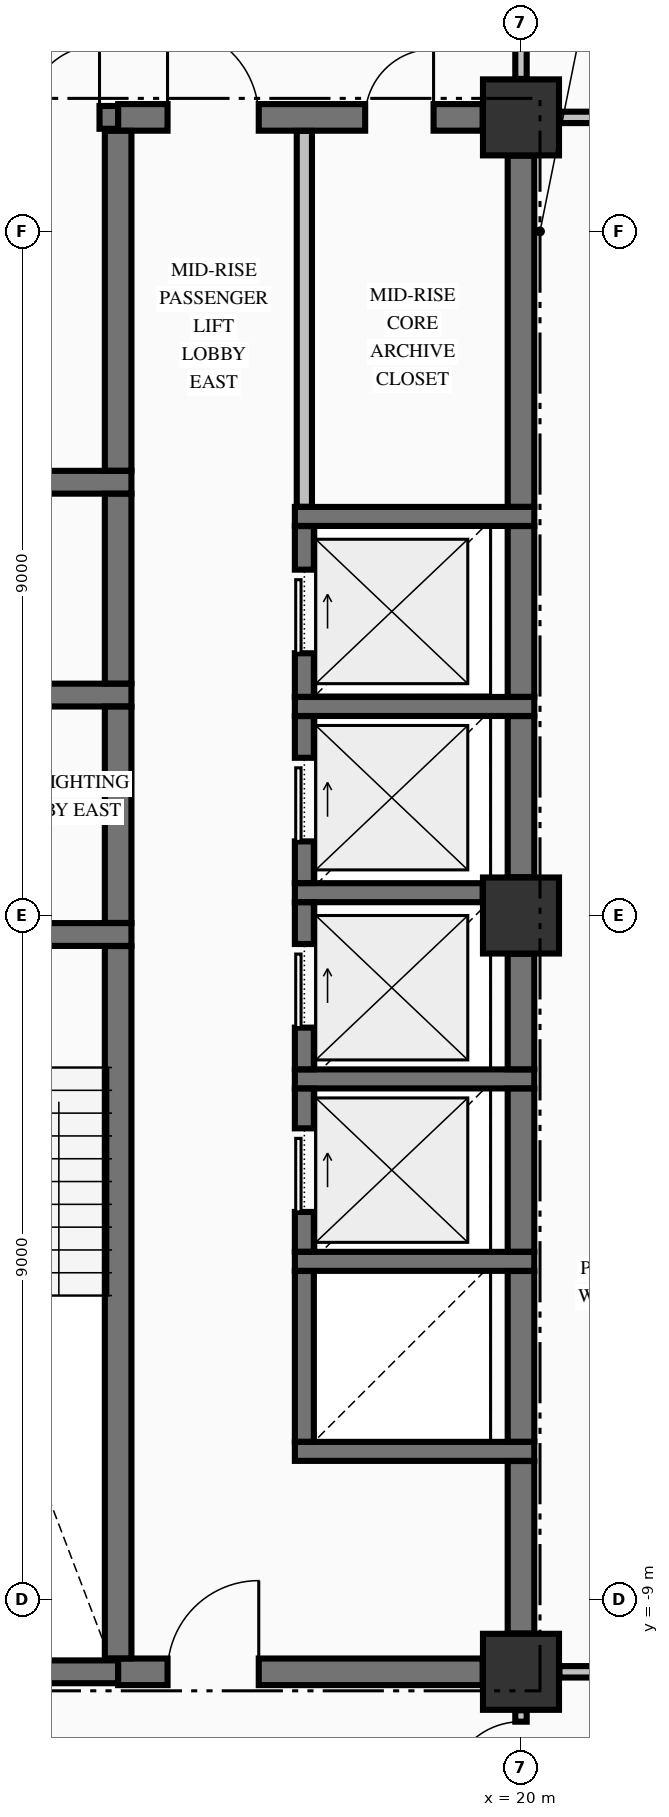
"""IFC4 building model, lengths in metres.
Left out: names, types, materials, properties, quantities, classifications, styles, units other than length and angle.
Written with IfcOpenShell. Run it as: python <this file> out.ifc"""

import sys

from ifc_helpers import new_model, si_unit, direction, frame, frame_2d, origin, origin_2d, place, context, subcontext, project, spatial, rectangle, extrude, element, fill, save


model = new_model("IFC4")
c1 = context("Model", 3, precision=1e-05, world=origin(), true_north=direction((0.0, 1.0)))
c2 = subcontext(c1, "Body", "Model", "MODEL_VIEW")
j1 = project(units=[si_unit("LENGTHUNIT", "METRE"), si_unit("PLANEANGLEUNIT", "RADIAN")], contexts=[c1])
p1 = place(None, origin())
s1 = spatial("IfcSite", under=j1, at=p1, CompositionType="ELEMENT")
p2 = place(p1, origin())
s2 = spatial("IfcBuilding", under=s1, at=p2, CompositionType="ELEMENT")
p3 = place(p2, frame((0.0, 0.0, 128.49)))
s3 = spatial("IfcBuildingStorey", under=s2, at=p3, CompositionType="ELEMENT", Elevation=128.49)
for number, where, z_axis, x_axis in (
    (1, (20.0, -9.95, -0.25), (0.0, 0.0, 1.0), (1.0, 0.0, 0.0)),
    (2, (20.0, 10.5, -0.25), (0.0, 0.0, 1.0), (1.0, 0.0, 0.0)),
    (3, (20.0, 0.0, -0.25), (0.0, 0.0, 1.0), (1.0, 0.0, 0.0)),
):
    element("IfcColumn", number, at=place(p3, frame(where, z_axis=z_axis, x_axis=x_axis)), inside=s3, PredefinedType="COLUMN", context=c2, shape_type="SweptSolid", body=[
        extrude(rectangle(XDim=1.0, YDim=1.0, at=origin_2d()), origin(), (0.0, 0.0, 1.0), 3.57),
    ])
p4 = place(p3, frame((11.504, -9.95, 0.0), z_axis=(0.0, 0.0, 1.0), x_axis=(1.0, 0.0, 0.0)))
e4 = element("IfcWall", 4, at=p4, inside=s3, PredefinedType="SHEAR", context=c2, shape_type="SweptSolid", body=[
    extrude(rectangle(XDim=3.196, YDim=0.3, at=frame_2d((1.598, 0.0))), origin(), (0.0, 0.0, 1.0), 3.32),
])
p5 = place(p3, frame((14.7, -9.95, 0.0), z_axis=(0.0, 0.0, 1.0), x_axis=(1.0, 0.0, 0.0)))
e5 = element("IfcWall", 5, at=p5, inside=s3, PredefinedType="SHEAR", context=c2, shape_type="SweptSolid", body=[
    extrude(rectangle(XDim=4.796, YDim=0.35, at=frame_2d((2.398, 0.0))), origin(), (0.0, 0.0, 1.0), 3.32),
])
p6 = place(p5, frame((0.65, 0.0, 0.0)))
e6 = element("IfcOpeningElement", 6, at=p6, cuts=e5, PredefinedType="OPENING", context=c2, shape_type="SweptSolid", body=[
    extrude(rectangle(XDim=1.2, YDim=2.15, at=frame_2d((0.6, 1.075))), frame((0.0, 0.185, 0.0), z_axis=(0.0, -1.0, 0.0), x_axis=(1.0, 0.0, 0.0)), (0.0, 0.0, 1.0), 0.37),
])
for number, where, z_axis, x_axis in (
    (7, (17.025, -7.05, 0.0), (0.0, 0.0, 1.0), (1.0, 0.0, 0.0)),
    (8, (17.025, -4.55, 0.0), (0.0, 0.0, 1.0), (1.0, 0.0, 0.0)),
    (9, (17.025, -2.15, 0.0), (0.0, 0.0, 1.0), (1.0, 0.0, 0.0)),
):
    element("IfcWall", number, at=place(p3, frame(where, z_axis=z_axis, x_axis=x_axis)), inside=s3, PredefinedType="SOLIDWALL", context=c2, shape_type="SweptSolid", body=[
        extrude(rectangle(XDim=3.15, YDim=0.25, at=frame_2d((1.575, 0.0))), origin(), (0.0, 0.0, 1.0), 3.32),
    ])
p7 = place(p3, frame((11.504, -0.25, 0.0), z_axis=(0.0, 0.0, 1.0), x_axis=(1.0, 0.0, 0.0)))
e10 = element("IfcWall", 10, at=p7, inside=s3, PredefinedType="SHEAR", context=c2, shape_type="SweptSolid", body=[
    extrude(rectangle(XDim=3.371, YDim=0.3, at=frame_2d((1.686, 0.0))), origin(), (0.0, 0.0, 1.0), 3.32),
])
p8 = place(p7, frame((1.096, 0.0, 0.0)))
e11 = element("IfcOpeningElement", 11, at=p8, cuts=e10, PredefinedType="OPENING", context=c2, shape_type="SweptSolid", body=[
    extrude(rectangle(XDim=1.1, YDim=2.15, at=frame_2d((0.55, 1.075))), frame((0.0, 0.16, 0.0), z_axis=(0.0, -1.0, 0.0), x_axis=(1.0, 0.0, 0.0)), (0.0, 0.0, 1.0), 0.32),
])
p9 = place(p3, frame((17.025, 0.3, 0.0), z_axis=(0.0, 0.0, 1.0), x_axis=(1.0, 0.0, 0.0)))
e12 = element("IfcWall", 12, at=p9, inside=s3, PredefinedType="SOLIDWALL", context=c2, shape_type="SweptSolid", body=[
    extrude(rectangle(XDim=2.471, YDim=0.25, at=frame_2d((1.236, 0.0))), origin(), (0.0, 0.0, 1.0), 3.32),
])
p10 = place(p3, frame((17.025, 2.75, 0.0), z_axis=(0.0, 0.0, 1.0), x_axis=(1.0, 0.0, 0.0)))
e13 = element("IfcWall", 13, at=p10, inside=s3, PredefinedType="SOLIDWALL", context=c2, shape_type="SweptSolid", body=[
    extrude(rectangle(XDim=3.15, YDim=0.25, at=frame_2d((1.575, 0.0))), origin(), (0.0, 0.0, 1.0), 3.32),
])
p11 = place(p3, frame((10.85, 2.9, 0.0), z_axis=(0.0, 0.0, 1.0), x_axis=(1.0, 0.0, 0.0)))
e14 = element("IfcWall", 14, at=p11, inside=s3, PredefinedType="SHEAR", context=c2, shape_type="SweptSolid", body=[
    extrude(rectangle(XDim=4.025, YDim=0.3, at=frame_2d((2.012, 0.0))), origin(), (0.0, 0.0, 1.0), 3.32),
])
p12 = place(p11, frame((0.85, 0.0, 0.0)))
e15 = element("IfcOpeningElement", 15, at=p12, cuts=e14, PredefinedType="OPENING", context=c2, shape_type="SweptSolid", body=[
    extrude(rectangle(XDim=1.1, YDim=2.2, at=frame_2d((0.55, 1.1))), frame((0.0, 0.16, 0.0), z_axis=(0.0, -1.0, 0.0), x_axis=(1.0, 0.0, 0.0)), (0.0, 0.0, 1.0), 0.32),
])
p13 = place(p3, frame((17.025, 5.25, 0.0), z_axis=(0.0, 0.0, 1.0), x_axis=(1.0, 0.0, 0.0)))
e16 = element("IfcWall", 16, at=p13, inside=s3, PredefinedType="SOLIDWALL", context=c2, shape_type="SweptSolid", body=[
    extrude(rectangle(XDim=3.15, YDim=0.25, at=frame_2d((1.575, 0.0))), origin(), (0.0, 0.0, 1.0), 3.32),
])
p14 = place(p3, frame((10.85, 5.7, 0.0), z_axis=(0.0, 0.0, 1.0), x_axis=(1.0, 0.0, 0.0)))
e17 = element("IfcWall", 17, at=p14, inside=s3, PredefinedType="SHEAR", context=c2, shape_type="SweptSolid", body=[
    extrude(rectangle(XDim=4.025, YDim=0.3, at=frame_2d((2.012, 0.0))), origin(), (0.0, 0.0, 1.0), 3.32),
])
p15 = place(p3, frame((11.504, 10.5, 0.0), z_axis=(0.0, 0.0, 1.0), x_axis=(1.0, 0.0, 0.0)))
e18 = element("IfcWall", 18, at=p15, inside=s3, PredefinedType="SHEAR", context=c2, shape_type="SweptSolid", body=[
    extrude(rectangle(XDim=3.196, YDim=0.3, at=frame_2d((1.598, 0.0))), origin(), (0.0, 0.0, 1.0), 3.32),
])
p16 = place(p15, frame((2.001, 0.0, 0.0)))
e19 = element("IfcOpeningElement", 19, at=p16, cuts=e18, PredefinedType="OPENING", context=c2, shape_type="SweptSolid", body=[
    extrude(rectangle(XDim=0.95, YDim=2.15, at=frame_2d((0.475, 1.075))), frame((0.0, 0.16, 0.0), z_axis=(0.0, -1.0, 0.0), x_axis=(1.0, 0.0, 0.0)), (0.0, 0.0, 1.0), 0.32),
])
p17 = place(p3, frame((14.7, 10.5, 0.0), z_axis=(0.0, 0.0, 1.0), x_axis=(1.0, 0.0, 0.0)))
e20 = element("IfcWall", 20, at=p17, inside=s3, PredefinedType="SHEAR", context=c2, shape_type="SweptSolid", body=[
    extrude(rectangle(XDim=4.796, YDim=0.35, at=frame_2d((2.398, 0.0))), origin(), (0.0, 0.0, 1.0), 3.32),
])
p18 = place(p17, frame((0.65, 0.0, 0.0)))
e21 = element("IfcOpeningElement", 21, at=p18, cuts=e20, PredefinedType="OPENING", context=c2, shape_type="SweptSolid", body=[
    extrude(rectangle(XDim=1.2, YDim=2.15, at=frame_2d((0.6, 1.075))), frame((0.0, 0.185, 0.0), z_axis=(0.0, -1.0, 0.0), x_axis=(1.0, 0.0, 0.0)), (0.0, 0.0, 1.0), 0.37),
])
p19 = place(p17, frame((3.25, 0.0, 0.0)))
e22 = element("IfcOpeningElement", 22, at=p19, cuts=e20, PredefinedType="OPENING", context=c2, shape_type="SweptSolid", body=[
    extrude(rectangle(XDim=0.9, YDim=2.15, at=frame_2d((0.45, 1.075))), frame((0.0, 0.185, 0.0), z_axis=(0.0, -1.0, 0.0), x_axis=(1.0, 0.0, 0.0)), (0.0, 0.0, 1.0), 0.37),
])
p20 = place(p3, frame((20.506, -9.95, 0.0), z_axis=(0.0, 0.0, 1.0), x_axis=(1.0, 0.0, 0.0)))
e23 = element("IfcWall", 23, at=p20, inside=s3, PredefinedType="PARTITIONING", context=c2, shape_type="SweptSolid", body=[
    extrude(rectangle(XDim=2.329, YDim=0.15, at=frame_2d((1.165, 0.0))), origin(), (0.0, 0.0, 1.0), 3.32),
])
p21 = place(p20, frame((0.494, 0.0, 0.0)))
e24 = element("IfcOpeningElement", 24, at=p21, cuts=e23, PredefinedType="OPENING", context=c2, shape_type="SweptSolid", body=[
    extrude(rectangle(XDim=1.0, YDim=2.15, at=frame_2d((0.5, 1.075))), frame((0.0, 0.085, 0.0), z_axis=(0.0, -1.0, 0.0), x_axis=(1.0, 0.0, 0.0)), (0.0, 0.0, 1.0), 0.17),
])
p22 = place(p3, frame((20.506, 10.5, 0.0), z_axis=(0.0, 0.0, 1.0), x_axis=(1.0, 0.0, 0.0)))
e25 = element("IfcWall", 25, at=p22, inside=s3, PredefinedType="PARTITIONING", context=c2, shape_type="SweptSolid", body=[
    extrude(rectangle(XDim=2.329, YDim=0.15, at=frame_2d((1.165, 0.0))), origin(), (0.0, 0.0, 1.0), 3.32),
])
p23 = place(p22, frame((0.494, 0.0, 0.0)))
e26 = element("IfcOpeningElement", 26, at=p23, cuts=e25, PredefinedType="OPENING", context=c2, shape_type="SweptSolid", body=[
    extrude(rectangle(XDim=1.0, YDim=2.15, at=frame_2d((0.5, 1.075))), frame((0.0, 0.085, 0.0), z_axis=(0.0, -1.0, 0.0), x_axis=(1.0, 0.0, 0.0)), (0.0, 0.0, 1.0), 0.17),
])
p24 = place(p3, frame((14.7, -9.773, 0.0), z_axis=(0.0, 0.0, 1.0), x_axis=(0.0, 1.0, 0.0)))
e27 = element("IfcWall", 27, at=p24, inside=s3, PredefinedType="SHEAR", context=c2, shape_type="SweptSolid", body=[
    extrude(rectangle(XDim=9.371, YDim=0.35, at=frame_2d((4.686, 0.0))), origin(), (0.0, 0.0, 1.0), 3.32),
])
p25 = place(p3, frame((14.7, -0.098, 0.0), z_axis=(0.0, 0.0, 1.0), x_axis=(0.0, 1.0, 0.0)))
e28 = element("IfcWall", 28, at=p25, inside=s3, PredefinedType="SHEAR", context=c2, shape_type="SweptSolid", body=[
    extrude(rectangle(XDim=2.846, YDim=0.35, at=frame_2d((1.423, 0.0))), origin(), (0.0, 0.0, 1.0), 3.32),
])
p26 = place(p3, frame((14.7, 3.052, 0.0), z_axis=(0.0, 0.0, 1.0), x_axis=(0.0, 1.0, 0.0)))
e29 = element("IfcWall", 29, at=p26, inside=s3, PredefinedType="SHEAR", context=c2, shape_type="SweptSolid", body=[
    extrude(rectangle(XDim=2.496, YDim=0.35, at=frame_2d((1.248, 0.0))), origin(), (0.0, 0.0, 1.0), 3.32),
])
p27 = place(p3, frame((14.7, 5.852, 0.0), z_axis=(0.0, 0.0, 1.0), x_axis=(0.0, 1.0, 0.0)))
e30 = element("IfcWall", 30, at=p27, inside=s3, PredefinedType="SHEAR", context=c2, shape_type="SweptSolid", body=[
    extrude(rectangle(XDim=4.471, YDim=0.35, at=frame_2d((2.235, 0.0))), origin(), (0.0, 0.0, 1.0), 3.32),
])
p28 = place(p3, frame((17.15, -6.923, 0.0), z_axis=(0.0, 0.0, 1.0), x_axis=(0.0, 1.0, 0.0)))
e31 = element("IfcWall", 31, at=p28, inside=s3, PredefinedType="SOLIDWALL", context=c2, shape_type="SweptSolid", body=[
    extrude(rectangle(XDim=2.246, YDim=0.25, at=frame_2d((1.123, 0.0))), origin(), (0.0, 0.0, 1.0), 3.32),
])
p29 = place(p3, frame((17.15, -4.423, 0.0), z_axis=(0.0, 0.0, 1.0), x_axis=(0.0, 1.0, 0.0)))
e32 = element("IfcWall", 32, at=p29, inside=s3, PredefinedType="SOLIDWALL", context=c2, shape_type="SweptSolid", body=[
    extrude(rectangle(XDim=2.146, YDim=0.25, at=frame_2d((1.073, 0.0))), origin(), (0.0, 0.0, 1.0), 3.32),
])
p30 = place(p29, frame((0.523, 0.0, 0.0)))
e33 = element("IfcOpeningElement", 33, at=p30, cuts=e32, PredefinedType="OPENING", context=c2, shape_type="SweptSolid", body=[
    extrude(rectangle(XDim=1.1, YDim=2.2, at=frame_2d((0.55, 1.1))), frame((0.0, 0.135, 0.0), z_axis=(0.0, -1.0, 0.0), x_axis=(1.0, 0.0, 0.0)), (0.0, 0.0, 1.0), 0.27),
])
p31 = place(p3, frame((17.15, -2.023, 0.0), z_axis=(0.0, 0.0, 1.0), x_axis=(0.0, 1.0, 0.0)))
e34 = element("IfcWall", 34, at=p31, inside=s3, PredefinedType="SOLIDWALL", context=c2, shape_type="SweptSolid", body=[
    extrude(rectangle(XDim=2.196, YDim=0.25, at=frame_2d((1.098, 0.0))), origin(), (0.0, 0.0, 1.0), 3.32),
])
p32 = place(p31, frame((0.548, 0.0, 0.0)))
e35 = element("IfcOpeningElement", 35, at=p32, cuts=e34, PredefinedType="OPENING", context=c2, shape_type="SweptSolid", body=[
    extrude(rectangle(XDim=1.1, YDim=2.2, at=frame_2d((0.55, 1.1))), frame((0.0, 0.135, 0.0), z_axis=(0.0, -1.0, 0.0), x_axis=(1.0, 0.0, 0.0)), (0.0, 0.0, 1.0), 0.27),
])
p33 = place(p3, frame((17.15, 0.427, 0.0), z_axis=(0.0, 0.0, 1.0), x_axis=(0.0, 1.0, 0.0)))
e36 = element("IfcWall", 36, at=p33, inside=s3, PredefinedType="SOLIDWALL", context=c2, shape_type="SweptSolid", body=[
    extrude(rectangle(XDim=2.196, YDim=0.25, at=frame_2d((1.098, 0.0))), origin(), (0.0, 0.0, 1.0), 3.32),
])
p34 = place(p33, frame((0.548, 0.0, 0.0)))
e37 = element("IfcOpeningElement", 37, at=p34, cuts=e36, PredefinedType="OPENING", context=c2, shape_type="SweptSolid", body=[
    extrude(rectangle(XDim=1.1, YDim=2.2, at=frame_2d((0.55, 1.1))), frame((0.0, 0.135, 0.0), z_axis=(0.0, -1.0, 0.0), x_axis=(1.0, 0.0, 0.0)), (0.0, 0.0, 1.0), 0.27),
])
p35 = place(p3, frame((17.15, 2.877, 0.0), z_axis=(0.0, 0.0, 1.0), x_axis=(0.0, 1.0, 0.0)))
e38 = element("IfcWall", 38, at=p35, inside=s3, PredefinedType="SOLIDWALL", context=c2, shape_type="SweptSolid", body=[
    extrude(rectangle(XDim=2.246, YDim=0.25, at=frame_2d((1.123, 0.0))), origin(), (0.0, 0.0, 1.0), 3.32),
])
p36 = place(p35, frame((0.573, 0.0, 0.0)))
e39 = element("IfcOpeningElement", 39, at=p36, cuts=e38, PredefinedType="OPENING", context=c2, shape_type="SweptSolid", body=[
    extrude(rectangle(XDim=1.1, YDim=2.2, at=frame_2d((0.55, 1.1))), frame((0.0, 0.135, 0.0), z_axis=(0.0, -1.0, 0.0), x_axis=(1.0, 0.0, 0.0)), (0.0, 0.0, 1.0), 0.27),
])
p37 = place(p3, frame((20.0, -9.446, 0.0), z_axis=(0.0, 0.0, 1.0), x_axis=(0.0, 1.0, 0.0)))
e40 = element("IfcWall", 40, at=p37, inside=s3, PredefinedType="SHEAR", context=c2, shape_type="SweptSolid", body=[
    extrude(rectangle(XDim=2.269, YDim=0.35, at=frame_2d((1.135, 0.0))), origin(), (0.0, 0.0, 1.0), 3.32),
])
p38 = place(p3, frame((20.0, -6.923, 0.0), z_axis=(0.0, 0.0, 1.0), x_axis=(0.0, 1.0, 0.0)))
e41 = element("IfcWall", 41, at=p38, inside=s3, PredefinedType="SHEAR", context=c2, shape_type="SweptSolid", body=[
    extrude(rectangle(XDim=2.246, YDim=0.35, at=frame_2d((1.123, 0.0))), origin(), (0.0, 0.0, 1.0), 3.32),
])
p39 = place(p3, frame((20.0, -4.423, 0.0), z_axis=(0.0, 0.0, 1.0), x_axis=(0.0, 1.0, 0.0)))
e42 = element("IfcWall", 42, at=p39, inside=s3, PredefinedType="SHEAR", context=c2, shape_type="SweptSolid", body=[
    extrude(rectangle(XDim=2.146, YDim=0.35, at=frame_2d((1.073, 0.0))), origin(), (0.0, 0.0, 1.0), 3.32),
])
p40 = place(p3, frame((20.0, -2.023, 0.0), z_axis=(0.0, 0.0, 1.0), x_axis=(0.0, 1.0, 0.0)))
e43 = element("IfcWall", 43, at=p40, inside=s3, PredefinedType="SHEAR", context=c2, shape_type="SweptSolid", body=[
    extrude(rectangle(XDim=1.519, YDim=0.35, at=frame_2d((0.76, 0.0))), origin(), (0.0, 0.0, 1.0), 3.32),
])
p41 = place(p3, frame((20.0, 0.504, 0.0), z_axis=(0.0, 0.0, 1.0), x_axis=(0.0, 1.0, 0.0)))
e44 = element("IfcWall", 44, at=p41, inside=s3, PredefinedType="SHEAR", context=c2, shape_type="SweptSolid", body=[
    extrude(rectangle(XDim=2.119, YDim=0.35, at=frame_2d((1.06, 0.0))), origin(), (0.0, 0.0, 1.0), 3.32),
])
p42 = place(p3, frame((20.0, 2.877, 0.0), z_axis=(0.0, 0.0, 1.0), x_axis=(0.0, 1.0, 0.0)))
e45 = element("IfcWall", 45, at=p42, inside=s3, PredefinedType="SHEAR", context=c2, shape_type="SweptSolid", body=[
    extrude(rectangle(XDim=2.246, YDim=0.35, at=frame_2d((1.123, 0.0))), origin(), (0.0, 0.0, 1.0), 3.32),
])
p43 = place(p3, frame((20.0, 5.377, 0.0), z_axis=(0.0, 0.0, 1.0), x_axis=(0.0, 1.0, 0.0)))
e46 = element("IfcWall", 46, at=p43, inside=s3, PredefinedType="SHEAR", context=c2, shape_type="SweptSolid", body=[
    extrude(rectangle(XDim=4.619, YDim=0.35, at=frame_2d((2.31, 0.0))), origin(), (0.0, 0.0, 1.0), 3.32),
])
p44 = place(p3, frame((17.15, 5.378, 0.0), z_axis=(0.0, 0.0, 1.0), x_axis=(0.0, 1.0, 0.0)))
e47 = element("IfcWall", 47, at=p44, inside=s3, PredefinedType="PARTITIONING", context=c2, shape_type="SweptSolid", body=[
    extrude(rectangle(XDim=4.944, YDim=0.2, at=frame_2d((2.472, 0.0))), origin(), (0.0, 0.0, 1.0), 3.32),
])
p45 = place(p3, frame((20.0, -12.122, 0.0), z_axis=(0.0, 0.0, 1.0), x_axis=(0.0, 1.0, 0.0)))
e48 = element("IfcWall", 48, at=p45, inside=s3, PredefinedType="PARTITIONING", context=c2, shape_type="SweptSolid", body=[
    extrude(rectangle(XDim=1.666, YDim=0.15, at=frame_2d((0.833, 0.0))), origin(), (0.0, 0.0, 1.0), 2.81),
])
p46 = place(p45, frame((0.566, 0.0, 0.0)))
e49 = element("IfcOpeningElement", 49, at=p46, cuts=e48, PredefinedType="OPENING", context=c2, shape_type="SweptSolid", body=[
    extrude(rectangle(XDim=0.95, YDim=2.15, at=frame_2d((0.475, 1.075))), frame((0.0, 0.085, 0.0), z_axis=(0.0, -1.0, 0.0), x_axis=(1.0, 0.0, 0.0)), (0.0, 0.0, 1.0), 0.17),
])
p47 = place(p3, frame((20.0, 11.006, 0.0), z_axis=(0.0, 0.0, 1.0), x_axis=(0.0, 1.0, 0.0)))
e50 = element("IfcWall", 50, at=p47, inside=s3, PredefinedType="PARTITIONING", context=c2, shape_type="SweptSolid", body=[
    extrude(rectangle(XDim=2.466, YDim=0.15, at=frame_2d((1.233, 0.0))), origin(), (0.0, 0.0, 1.0), 2.81),
])
p48 = place(p47, frame((0.549, 0.0, 0.0)))
e51 = element("IfcOpeningElement", 51, at=p48, cuts=e50, PredefinedType="OPENING", context=c2, shape_type="SweptSolid", body=[
    extrude(rectangle(XDim=0.95, YDim=2.15, at=frame_2d((0.475, 1.075))), frame((0.0, 0.085, 0.0), z_axis=(0.0, -1.0, 0.0), x_axis=(1.0, 0.0, 0.0)), (0.0, 0.0, 1.0), 0.17),
])
p49 = place(p16, origin())
e52 = element("IfcDoor", 52, at=p49, inside=s3, OperationType="SINGLE_SWING_RIGHT", PredefinedType="DOOR", context=c2, shape_type="SweptSolid", body=[
    extrude(rectangle(XDim=0.95, YDim=2.15, at=frame_2d((0.475, 1.075))), frame((0.0, 0.025, 0.0), z_axis=(0.0, -1.0, 0.0), x_axis=(1.0, 0.0, 0.0)), (0.0, 0.0, 1.0), 0.05),
])
fill(e19, e52)
p50 = place(p30, origin())
e53 = element("IfcDoor", 53, at=p50, inside=s3, OperationType="SLIDING_TO_RIGHT", PredefinedType="DOOR", context=c2, shape_type="SweptSolid", body=[
    extrude(rectangle(XDim=1.1, YDim=2.2, at=frame_2d((0.55, 1.1))), frame((0.0, 0.025, 0.0), z_axis=(0.0, -1.0, 0.0), x_axis=(1.0, 0.0, 0.0)), (0.0, 0.0, 1.0), 0.05),
])
fill(e33, e53)
p51 = place(p32, origin())
e54 = element("IfcDoor", 54, at=p51, inside=s3, OperationType="SLIDING_TO_RIGHT", PredefinedType="DOOR", context=c2, shape_type="SweptSolid", body=[
    extrude(rectangle(XDim=1.1, YDim=2.2, at=frame_2d((0.55, 1.1))), frame((0.0, 0.025, 0.0), z_axis=(0.0, -1.0, 0.0), x_axis=(1.0, 0.0, 0.0)), (0.0, 0.0, 1.0), 0.05),
])
fill(e35, e54)
p52 = place(p34, origin())
e55 = element("IfcDoor", 55, at=p52, inside=s3, OperationType="SLIDING_TO_RIGHT", PredefinedType="DOOR", context=c2, shape_type="SweptSolid", body=[
    extrude(rectangle(XDim=1.1, YDim=2.2, at=frame_2d((0.55, 1.1))), frame((0.0, 0.025, 0.0), z_axis=(0.0, -1.0, 0.0), x_axis=(1.0, 0.0, 0.0)), (0.0, 0.0, 1.0), 0.05),
])
fill(e37, e55)
p53 = place(p36, origin())
e56 = element("IfcDoor", 56, at=p53, inside=s3, OperationType="SLIDING_TO_RIGHT", PredefinedType="DOOR", context=c2, shape_type="SweptSolid", body=[
    extrude(rectangle(XDim=1.1, YDim=2.2, at=frame_2d((0.55, 1.1))), frame((0.0, 0.025, 0.0), z_axis=(0.0, -1.0, 0.0), x_axis=(1.0, 0.0, 0.0)), (0.0, 0.0, 1.0), 0.05),
])
fill(e39, e56)
p54 = place(p6, origin())
e57 = element("IfcDoor", 57, at=p54, inside=s3, OperationType="SINGLE_SWING_RIGHT", PredefinedType="DOOR", context=c2, shape_type="SweptSolid", body=[
    extrude(rectangle(XDim=1.2, YDim=2.15, at=frame_2d((0.6, 1.075))), frame((0.0, 0.025, 0.0), z_axis=(0.0, -1.0, 0.0), x_axis=(1.0, 0.0, 0.0)), (0.0, 0.0, 1.0), 0.05),
])
fill(e6, e57)
p55 = place(p18, origin())
e58 = element("IfcDoor", 58, at=p55, inside=s3, OperationType="SINGLE_SWING_LEFT", PredefinedType="DOOR", context=c2, shape_type="SweptSolid", body=[
    extrude(rectangle(XDim=1.2, YDim=2.15, at=frame_2d((0.6, 1.075))), frame((0.0, 0.025, 0.0), z_axis=(0.0, -1.0, 0.0), x_axis=(1.0, 0.0, 0.0)), (0.0, 0.0, 1.0), 0.05),
])
fill(e21, e58)
p56 = place(p19, origin())
e59 = element("IfcDoor", 59, at=p56, inside=s3, OperationType="SINGLE_SWING_RIGHT", PredefinedType="DOOR", context=c2, shape_type="SweptSolid", body=[
    extrude(rectangle(XDim=0.9, YDim=2.15, at=frame_2d((0.45, 1.075))), frame((0.0, 0.025, 0.0), z_axis=(0.0, -1.0, 0.0), x_axis=(1.0, 0.0, 0.0)), (0.0, 0.0, 1.0), 0.05),
])
fill(e22, e59)
p57 = place(p46, origin())
e60 = element("IfcDoor", 60, at=p57, inside=s3, OperationType="SINGLE_SWING_LEFT", PredefinedType="DOOR", context=c2, shape_type="SweptSolid", body=[
    extrude(rectangle(XDim=0.95, YDim=2.15, at=frame_2d((0.475, 1.075))), frame((0.0, 0.025, 0.0), z_axis=(0.0, -1.0, 0.0), x_axis=(1.0, 0.0, 0.0)), (0.0, 0.0, 1.0), 0.05),
])
fill(e49, e60)
save(model, sys.argv[1])
